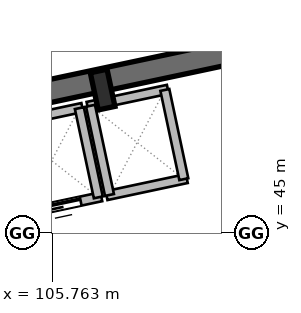
"""IFC4 building model, lengths in metres.
Left out: names, types, materials, properties, quantities, classifications, styles, units other than length and angle.
Written with IfcOpenShell. Run it as: python <this file> out.ifc"""

import sys

from ifc_helpers import new_model, si_unit, direction, frame, frame_2d, origin, origin_2d, place, context, subcontext, project, spatial, rectangle, i_section, extrude, element, fill, save


model = new_model("IFC4")
c1 = context("Model", 3, precision=1e-05, world=origin(), true_north=direction((0.0, 1.0)))
c2 = subcontext(c1, "Body", "Model", "MODEL_VIEW")
j1 = project(units=[si_unit("LENGTHUNIT", "METRE"), si_unit("PLANEANGLEUNIT", "RADIAN")], contexts=[c1])
p1 = place(None, origin())
s1 = spatial("IfcSite", under=j1, at=p1, CompositionType="ELEMENT")
p2 = place(p1, origin())
s2 = spatial("IfcBuilding", under=s1, at=p2, CompositionType="ELEMENT")
p3 = place(p2, frame((0.0, 0.0, 20.4)))
s3 = spatial("IfcBuildingStorey", under=s2, at=p3, CompositionType="ELEMENT", Elevation=20.4)
p4 = place(p3, frame((96.463, 46.77, 0.0), z_axis=(0.0, 0.0, 1.0), x_axis=(0.978147272959, 0.207913232873, 0.0)))
e1 = element("IfcWall", 1, at=p4, inside=s3, PredefinedType="SHEAR", context=c2, shape_type="SweptSolid", body=[
    extrude(rectangle(XDim=21.6, YDim=0.6, at=frame_2d((10.8, 0.0))), origin(), (0.0, 0.0, 1.0), 4.8),
])
p5 = place(p3, frame((107.079, 48.771, 0.0), z_axis=(0.0, 0.0, 1.0), x_axis=(0.978147600734, 0.207911690818, 0.0)))
e2 = element("IfcColumn", 2, at=p5, inside=s3, PredefinedType="COLUMN", context=c2, shape_type="SweptSolid", body=[
    extrude(i_section(OverallWidth=0.45, OverallDepth=1.0, WebThickness=0.022, FlangeThickness=0.04, at=origin_2d()), origin(), (0.0, 0.0, 1.0), 4.8),
])
p6 = place(p3, frame((106.186, 39.022, 0.0), z_axis=(0.0, 0.0, 1.0), x_axis=(-0.207916691923, 0.978146537703, 0.0)))
e3 = element("IfcWall", 3, at=p6, inside=s3, PredefinedType="PARTITIONING", context=c2, shape_type="SweptSolid", body=[
    extrude(rectangle(XDim=6.35, YDim=0.2, at=frame_2d((3.175, 0.0))), origin(), (0.0, 0.0, 1.0), 4.43),
])
p7 = place(p6, frame((2.8, 0.0, 0.0)))
e4 = element("IfcOpeningElement", 4, at=p7, cuts=e3, PredefinedType="OPENING", context=c2, shape_type="SweptSolid", body=[
    extrude(rectangle(XDim=1.05, YDim=2.1, at=frame_2d((0.525, 1.05))), frame((0.0, 0.11, 0.0), z_axis=(0.0, -1.0, 0.0), x_axis=(1.0, 0.0, 0.0)), (0.0, 0.0, 1.0), 0.22),
])
p8 = place(p3, frame((104.931, 45.503, 0.0), z_axis=(0.0, 0.0, 1.0), x_axis=(0.97813528961, 0.207969601673, 0.0)))
e5 = element("IfcWall", 5, at=p8, inside=s3, PredefinedType="PARTITIONING", context=c2, shape_type="SweptSolid", body=[
    extrude(rectangle(XDim=2.16, YDim=0.24, at=frame_2d((1.08, 0.0))), origin(), (0.0, 0.0, 1.0), 4.43),
])
p9 = place(p8, frame((0.555, 0.0, 0.0)))
e6 = element("IfcOpeningElement", 6, at=p9, cuts=e5, PredefinedType="OPENING", context=c2, shape_type="SweptSolid", body=[
    extrude(rectangle(XDim=1.05, YDim=2.15, at=frame_2d((0.525, 1.075))), frame((0.0, 0.13, 0.0), z_axis=(0.0, -1.0, 0.0), x_axis=(1.0, 0.0, 0.0)), (0.0, 0.0, 1.0), 0.26),
])
p10 = place(p3, frame((104.432, 47.851, 0.0), z_axis=(0.0, 0.0, 1.0), x_axis=(0.978158276388, 0.207861459473, 0.0)))
e7 = element("IfcWall", 7, at=p10, inside=s3, PredefinedType="PARTITIONING", context=c2, shape_type="SweptSolid", body=[
    extrude(rectangle(XDim=2.16, YDim=0.24, at=frame_2d((1.08, 0.0))), origin(), (0.0, 0.0, 1.0), 4.43),
])
p11 = place(p3, frame((106.966, 45.936, 0.0), z_axis=(0.0, 0.0, 1.0), x_axis=(-0.207937840262, 0.978142042133, 0.0)))
e8 = element("IfcWall", 8, at=p11, inside=s3, PredefinedType="PARTITIONING", context=c2, shape_type="SweptSolid", body=[
    extrude(rectangle(XDim=2.4, YDim=0.24, at=frame_2d((1.2, 0.0))), origin(), (0.0, 0.0, 1.0), 4.43),
])
for number, where, z_axis, x_axis in (
    (9, (107.181, 45.981, 0.0), (0.0, 0.0, 1.0), (0.978, 0.208, 0.0)),
    (10, (106.682, 48.329, 0.0), (0.0, 0.0, 1.0), (0.978, 0.208, 0.0)),
):
    element("IfcWall", number, at=place(p3, frame(where, z_axis=z_axis, x_axis=x_axis)), inside=s3, PredefinedType="PARTITIONING", context=c2, shape_type="SweptSolid", body=[
        extrude(rectangle(XDim=2.16, YDim=0.24, at=frame_2d((1.08, 0.0))), origin(), (0.0, 0.0, 1.0), 4.43),
    ])
for number, where, z_axis, x_axis in (
    (11, (107.26, 45.998, 0.0), (0.0, 0.0, 1.0), (-0.208, 0.978, 0.0)),
    (12, (109.216, 46.414, 0.0), (0.0, 0.0, 1.0), (-0.208, 0.978, 0.0)),
):
    element("IfcWall", number, at=place(p3, frame(where, z_axis=z_axis, x_axis=x_axis)), inside=s3, PredefinedType="PARTITIONING", context=c2, shape_type="SweptSolid", body=[
        extrude(rectangle(XDim=2.4, YDim=0.24, at=frame_2d((1.2, 0.0))), origin(), (0.0, 0.0, 1.0), 4.43),
    ])
p12 = place(p9, origin())
e13 = element("IfcDoor", 13, at=p12, inside=s3, OperationType="SLIDING_TO_LEFT", PredefinedType="DOOR", context=c2, shape_type="SweptSolid", body=[
    extrude(rectangle(XDim=1.05, YDim=2.15, at=frame_2d((0.525, 1.075))), frame((0.0, 0.025, 0.0), z_axis=(0.0, -1.0, 0.0), x_axis=(1.0, 0.0, 0.0)), (0.0, 0.0, 1.0), 0.05),
])
fill(e6, e13)
save(model, sys.argv[1])
